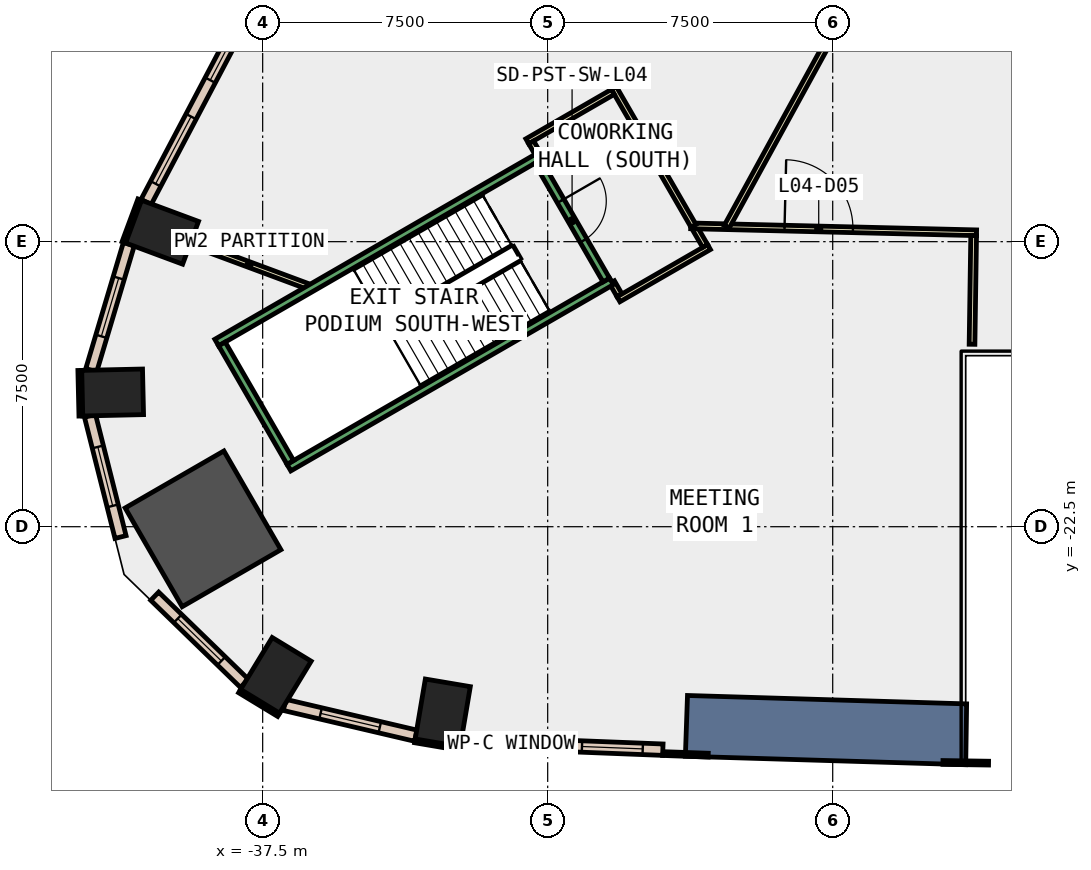
"""IFC4 building model, lengths in metres.
Left out: names, types, materials, properties, quantities, classifications, styles, units other than length and angle.
Written with IfcOpenShell. Run it as: python <this file> out.ifc"""

import sys

from ifc_helpers import new_model, si_unit, direction, frame, frame_2d, origin, origin_2d, place, context, subcontext, project, spatial, polyline, rectangle, outline, extrude, element, fill, save


model = new_model("IFC4")
c1 = context("Model", 3, precision=1e-05, world=origin(), true_north=direction((0.0, 1.0)))
c2 = subcontext(c1, "Body", "Model", "MODEL_VIEW")
j1 = project(units=[si_unit("LENGTHUNIT", "METRE"), si_unit("PLANEANGLEUNIT", "RADIAN")], contexts=[c1])
p1 = place(None, origin())
s1 = spatial("IfcSite", under=j1, at=p1, CompositionType="ELEMENT")
p2 = place(p1, origin())
s2 = spatial("IfcBuilding", under=s1, at=p2, CompositionType="ELEMENT")
p3 = place(p2, frame((0.0, 0.0, 25.0)))
s3 = spatial("IfcBuildingStorey", under=s2, at=p3, CompositionType="ELEMENT", Elevation=25.0)
for number, where, z_axis, x_axis in (
    (1, (-32.761, -27.397, -0.45), (0.0, 0.0, 1.0), (-0.986, 0.167, 0.0)),
    (2, (-40.147, -14.751, -0.45), (0.0, 0.0, 1.0), (0.348, 0.937, 0.0)),
    (3, (-41.448, -18.969, -0.45), (0.0, 0.0, 1.0), (-0.023, 1.0, 0.0)),
):
    element("IfcColumn", number, at=place(p3, frame(where, z_axis=z_axis, x_axis=x_axis)), inside=s3, PredefinedType="COLUMN", context=c2, shape_type="SweptSolid", body=[
        extrude(rectangle(XDim=1.2, YDim=1.6, at=origin_2d()), origin(), (0.0, 0.0, 1.0), 5.0),
    ])
p4 = place(p3, frame((-39.069, -22.556, -0.45), z_axis=(0.0, 0.0, 1.0), x_axis=(0.866025403784, 0.5, 0.0)))
e4 = element("IfcColumn", 4, at=p4, inside=s3, PredefinedType="COLUMN", context=c2, shape_type="SweptSolid", body=[
    extrude(rectangle(XDim=3.0, YDim=3.0, at=origin_2d()), origin(), (0.0, 0.0, 1.0), 5.0),
])
p5 = place(p3, frame((-37.152, -26.411, -0.45), z_axis=(0.0, 0.0, 1.0), x_axis=(-0.854522294989, 0.519414716163, 0.0)))
e5 = element("IfcColumn", 5, at=p5, inside=s3, PredefinedType="COLUMN", context=c2, shape_type="SweptSolid", body=[
    extrude(rectangle(XDim=1.2, YDim=1.6, at=origin_2d()), origin(), (0.0, 0.0, 1.0), 5.0),
])
p6 = place(p3, frame((0.0, 0.0, -0.45)))
e6 = element("IfcWall", 6, at=p6, inside=s3, PredefinedType="SHEAR", context=c2, shape_type="SweptSolid", body=[
    extrude(outline(polyline([(-26.377, -28.54), (-19.0, -28.762), (-18.976, -27.162), (-26.321, -26.941), (-26.377, -28.54)])), origin(), (0.0, 0.0, 1.0), 5.0),
])
p7 = place(p3, frame((-40.735, -13.893, 0.0), z_axis=(0.0, 0.0, 1.0), x_axis=(-0.348268249601, -0.937394914814, 0.0)))
e7 = element("IfcWall", 7, at=p7, inside=s3, PredefinedType="STANDARD", context=c2, shape_type="SweptSolid", body=[
    extrude(rectangle(XDim=1.2, YDim=0.1, at=frame_2d((0.6, 0.0))), origin(), (0.0, 0.0, 1.0), 4.55),
])
p8 = place(p3, frame((-33.494, -28.135, 0.0), z_axis=(0.0, 0.0, 1.0), x_axis=(0.986011774526, -0.166675674579, 0.0)))
e8 = element("IfcWall", 8, at=p8, inside=s3, PredefinedType="STANDARD", context=c2, shape_type="SweptSolid", body=[
    extrude(rectangle(XDim=1.2, YDim=0.1, at=frame_2d((0.6, 0.0))), origin(), (0.0, 0.0, 1.0), 4.55),
])
p9 = place(p3, frame((-26.975, -28.469, 0.0), z_axis=(0.0, 0.0, 1.0), x_axis=(0.999387493042, -0.034994838926, 0.0)))
e9 = element("IfcWall", 9, at=p9, inside=s3, PredefinedType="STANDARD", context=c2, shape_type="SweptSolid", body=[
    extrude(rectangle(XDim=1.2, YDim=0.1, at=frame_2d((0.6, 0.0))), origin(), (0.0, 0.0, 1.0), 4.55),
])
p10 = place(p3, frame((-19.599, -28.703, 0.0), z_axis=(0.0, 0.0, 1.0), x_axis=(0.999886724523, -0.015051183404, 0.0)))
e10 = element("IfcWall", 10, at=p10, inside=s3, PredefinedType="STANDARD", context=c2, shape_type="SweptSolid", body=[
    extrude(rectangle(XDim=1.2, YDim=0.1, at=frame_2d((0.6, 0.0))), origin(), (0.0, 0.0, 1.0), 4.55),
])
for number, where, z_axis, x_axis in (
    (11, (-42.312, -18.388, 0.0), (0.0, 0.0, 1.0), (0.023, -1.0, 0.0)),
    (12, (-38.106, -26.826, 0.0), (0.0, 0.0, 1.0), (0.855, -0.519, 0.0)),
):
    element("IfcWall", number, at=place(p3, frame(where, z_axis=z_axis, x_axis=x_axis)), inside=s3, PredefinedType="STANDARD", context=c2, shape_type="SweptSolid", body=[
        extrude(rectangle(XDim=1.2, YDim=0.1, at=frame_2d((0.6, 0.0))), origin(), (0.0, 0.0, 1.0), 4.55),
    ])
p11 = place(p3, frame((-32.282, -28.159, 0.0), z_axis=(0.0, 0.0, 1.0), x_axis=(0.999234205654, -0.039128023863, 0.0)))
e13 = element("IfcWall", 13, at=p11, inside=s3, PredefinedType="STANDARD", context=c2, shape_type="SweptSolid", body=[
    extrude(rectangle(XDim=5.316, YDim=0.3, at=frame_2d((2.658, 0.0))), origin(), (0.0, 0.0, 1.0), 4.55),
])
p12 = place(p11, frame((0.529, 0.0, 1.0)))
e14 = element("IfcOpeningElement", 14, at=p12, cuts=e13, PredefinedType="OPENING", context=c2, shape_type="SweptSolid", body=[
    extrude(rectangle(XDim=1.6, YDim=3.2, at=frame_2d((0.8, 1.6))), frame((0.0, 0.16, 0.0), z_axis=(0.0, -1.0, 0.0), x_axis=(1.0, 0.0, 0.0)), (0.0, 0.0, 1.0), 0.32),
])
p13 = place(p11, frame((3.187, 0.0, 1.0)))
e15 = element("IfcOpeningElement", 15, at=p13, cuts=e13, PredefinedType="OPENING", context=c2, shape_type="SweptSolid", body=[
    extrude(rectangle(XDim=1.6, YDim=3.2, at=frame_2d((0.8, 1.6))), frame((0.0, 0.16, 0.0), z_axis=(0.0, -1.0, 0.0), x_axis=(1.0, 0.0, 0.0)), (0.0, 0.0, 1.0), 0.32),
])
p14 = place(p3, frame((-37.695, -8.503, 0.0), z_axis=(0.0, 0.0, 1.0), x_axis=(-0.466125129602, -0.884718804792, 0.0)))
e16 = element("IfcWall", 16, at=p14, inside=s3, PredefinedType="STANDARD", context=c2, shape_type="SweptSolid", body=[
    extrude(rectangle(XDim=6.164, YDim=0.3, at=frame_2d((3.082, 0.0))), origin(), (0.0, 0.0, 1.0), 4.55),
])
p15 = place(p14, frame((0.541, 0.0, 1.0)))
e17 = element("IfcOpeningElement", 17, at=p15, cuts=e16, PredefinedType="OPENING", context=c2, shape_type="SweptSolid", body=[
    extrude(rectangle(XDim=2.0, YDim=3.2, at=frame_2d((1.0, 1.6))), frame((0.0, 0.16, 0.0), z_axis=(0.0, -1.0, 0.0), x_axis=(1.0, 0.0, 0.0)), (0.0, 0.0, 1.0), 0.32),
])
p16 = place(p14, frame((3.623, 0.0, 1.0)))
e18 = element("IfcOpeningElement", 18, at=p16, cuts=e16, PredefinedType="OPENING", context=c2, shape_type="SweptSolid", body=[
    extrude(rectangle(XDim=2.0, YDim=3.2, at=frame_2d((1.0, 1.6))), frame((0.0, 0.16, 0.0), z_axis=(0.0, -1.0, 0.0), x_axis=(1.0, 0.0, 0.0)), (0.0, 0.0, 1.0), 0.32),
])
p17 = place(p3, frame((-41.022, -15.066, 0.0), z_axis=(0.0, 0.0, 1.0), x_axis=(-0.285800575124, -0.958289116738, 0.0)))
e19 = element("IfcWall", 19, at=p17, inside=s3, PredefinedType="STANDARD", context=c2, shape_type="SweptSolid", body=[
    extrude(rectangle(XDim=3.46, YDim=0.3, at=frame_2d((1.73, 0.0))), origin(), (0.0, 0.0, 1.0), 4.55),
])
p18 = place(p17, frame((0.93, 0.0, 1.0)))
e20 = element("IfcOpeningElement", 20, at=p18, cuts=e19, PredefinedType="OPENING", context=c2, shape_type="SweptSolid", body=[
    extrude(rectangle(XDim=1.6, YDim=3.2, at=frame_2d((0.8, 1.6))), frame((0.0, 0.16, 0.0), z_axis=(0.0, -1.0, 0.0), x_axis=(1.0, 0.0, 0.0)), (0.0, 0.0, 1.0), 0.32),
])
p19 = place(p3, frame((-42.044, -19.581, 0.0), z_axis=(0.0, 0.0, 1.0), x_axis=(0.244315836028, -0.969695711172, 0.0)))
e21 = element("IfcWall", 21, at=p19, inside=s3, PredefinedType="STANDARD", context=c2, shape_type="SweptSolid", body=[
    extrude(rectangle(XDim=3.291, YDim=0.3, at=frame_2d((1.645, 0.0))), origin(), (0.0, 0.0, 1.0), 4.55),
])
p20 = place(p19, frame((0.845, 0.0, 1.0)))
e22 = element("IfcOpeningElement", 22, at=p20, cuts=e21, PredefinedType="OPENING", context=c2, shape_type="SweptSolid", body=[
    extrude(rectangle(XDim=1.6, YDim=3.2, at=frame_2d((0.8, 1.6))), frame((0.0, 0.16, 0.0), z_axis=(0.0, -1.0, 0.0), x_axis=(1.0, 0.0, 0.0)), (0.0, 0.0, 1.0), 0.32),
])
p21 = place(p3, frame((-40.341, -24.329, 0.0), z_axis=(0.0, 0.0, 1.0), x_axis=(0.717527250225, -0.696530433782, 0.0)))
e23 = element("IfcWall", 23, at=p21, inside=s3, PredefinedType="STANDARD", context=c2, shape_type="SweptSolid", body=[
    extrude(rectangle(XDim=3.291, YDim=0.3, at=frame_2d((1.645, 0.0))), origin(), (0.0, 0.0, 1.0), 4.55),
])
p22 = place(p21, frame((0.845, 0.0, 1.0)))
e24 = element("IfcOpeningElement", 24, at=p22, cuts=e23, PredefinedType="OPENING", context=c2, shape_type="SweptSolid", body=[
    extrude(rectangle(XDim=1.6, YDim=3.2, at=frame_2d((0.8, 1.6))), frame((0.0, 0.16, 0.0), z_axis=(0.0, -1.0, 0.0), x_axis=(1.0, 0.0, 0.0)), (0.0, 0.0, 1.0), 0.32),
])
p23 = place(p3, frame((-36.923, -27.189, 0.0), z_axis=(0.0, 0.0, 1.0), x_axis=(0.97357041301, -0.228387063799, 0.0)))
e25 = element("IfcWall", 25, at=p23, inside=s3, PredefinedType="STANDARD", context=c2, shape_type="SweptSolid", body=[
    extrude(rectangle(XDim=3.547, YDim=0.3, at=frame_2d((1.773, 0.0))), origin(), (0.0, 0.0, 1.0), 4.55),
])
p24 = place(p23, frame((0.973, 0.0, 1.0)))
e26 = element("IfcOpeningElement", 26, at=p24, cuts=e25, PredefinedType="OPENING", context=c2, shape_type="SweptSolid", body=[
    extrude(rectangle(XDim=1.6, YDim=3.2, at=frame_2d((0.8, 1.6))), frame((0.0, 0.16, 0.0), z_axis=(0.0, -1.0, 0.0), x_axis=(1.0, 0.0, 0.0)), (0.0, 0.0, 1.0), 0.32),
])
p25 = place(p3, frame((-39.378, -15.037, 0.0), z_axis=(0.0, 0.0, 1.0), x_axis=(0.937400028274, -0.348254485961, 0.0)))
e27 = element("IfcWall", 27, at=p25, inside=s3, PredefinedType="PARTITIONING", context=c2, shape_type="SweptSolid", body=[
    extrude(rectangle(XDim=3.247, YDim=0.15, at=frame_2d((1.624, 0.0))), origin(), (0.0, 0.0, 1.0), 4.55),
])
p26 = place(p3, frame((-28.309, -16.067, 0.0), z_axis=(0.0, 0.0, 1.0), x_axis=(0.499546646484, -0.86628698939, 0.0)))
e28 = element("IfcWall", 28, at=p26, inside=s3, PredefinedType="PARTITIONING", context=c2, shape_type="SweptSolid", body=[
    extrude(rectangle(XDim=0.401, YDim=0.15, at=frame_2d((0.2, 0.0))), origin(), (0.0, 0.0, 1.0), 4.55),
])
p27 = place(p3, frame((-28.137, -16.516, 0.0), z_axis=(0.0, 0.0, 1.0), x_axis=(0.866225489901, 0.499653280431, 0.0)))
e29 = element("IfcWall", 29, at=p27, inside=s3, PredefinedType="PARTITIONING", context=c2, shape_type="SweptSolid", body=[
    extrude(rectangle(XDim=2.75, YDim=0.15, at=frame_2d((1.375, 0.0))), origin(), (0.0, 0.0, 1.0), 4.55),
])
p28 = place(p3, frame((-25.857, -15.114, 0.0), z_axis=(0.0, 0.0, 1.0), x_axis=(-0.500357623318, 0.865818831389, 0.0)))
e30 = element("IfcWall", 30, at=p28, inside=s3, PredefinedType="PARTITIONING", context=c2, shape_type="SweptSolid", body=[
    extrude(rectangle(XDim=0.61, YDim=0.15, at=frame_2d((0.305, 0.0))), origin(), (0.0, 0.0, 1.0), 4.55),
])
p29 = place(p3, frame((-26.236, -14.584, 0.0), z_axis=(0.0, 0.0, 1.0), x_axis=(0.999706920069, -0.024208964564, 0.0)))
e31 = element("IfcWall", 31, at=p29, inside=s3, PredefinedType="PARTITIONING", context=c2, shape_type="SweptSolid", body=[
    extrude(rectangle(XDim=7.523, YDim=0.15, at=frame_2d((3.762, 0.0))), origin(), (0.0, 0.0, 1.0), 4.55),
])
p30 = place(p29, frame((2.469, 0.0, 0.0)))
e32 = element("IfcOpeningElement", 32, at=p30, cuts=e31, PredefinedType="OPENING", context=c2, shape_type="SweptSolid", body=[
    extrude(rectangle(XDim=1.8, YDim=2.1, at=frame_2d((0.9, 1.05))), frame((0.0, 0.085, 0.0), z_axis=(0.0, -1.0, 0.0), x_axis=(1.0, 0.0, 0.0)), (0.0, 0.0, 1.0), 0.17),
])
p31 = place(p3, frame((-18.791, -14.839, 0.0), z_axis=(0.0, 0.0, 1.0), x_axis=(-0.015017934076, -0.999887224469, 0.0)))
e33 = element("IfcWall", 33, at=p31, inside=s3, PredefinedType="PARTITIONING", context=c2, shape_type="SweptSolid", body=[
    extrude(rectangle(XDim=2.861, YDim=0.15, at=frame_2d((1.431, 0.0))), origin(), (0.0, 0.0, 1.0), 4.55),
])
p32 = place(p3, frame((-26.162, -14.586, 0.0), z_axis=(0.0, 0.0, 1.0), x_axis=(-0.500142678011, 0.865943012924, 0.0)))
e34 = element("IfcWall", 34, at=p32, inside=s3, PredefinedType="PARTITIONING", context=c2, shape_type="SweptSolid", body=[
    extrude(rectangle(XDim=4.191, YDim=0.15, at=frame_2d((2.095, 0.0))), origin(), (0.0, 0.0, 1.0), 4.55),
])
p33 = place(p3, frame((-28.285, -11.059, 0.0), z_axis=(0.0, 0.0, 1.0), x_axis=(-0.866108986466, -0.499855202596, 0.0)))
e35 = element("IfcWall", 35, at=p33, inside=s3, PredefinedType="PARTITIONING", context=c2, shape_type="SweptSolid", body=[
    extrude(rectangle(XDim=2.6, YDim=0.15, at=frame_2d((1.3, 0.0))), origin(), (0.0, 0.0, 1.0), 4.55),
])
p34 = place(p3, frame((-30.434, -12.387, 0.0), z_axis=(0.0, 0.0, 1.0), x_axis=(0.500867716848, -0.865523847285, 0.0)))
e36 = element("IfcWall", 36, at=p34, inside=s3, PredefinedType="PARTITIONING", context=c2, shape_type="SweptSolid", body=[
    extrude(rectangle(XDim=0.4, YDim=0.15, at=frame_2d((0.2, 0.0))), origin(), (0.0, 0.0, 1.0), 4.55),
])
p35 = place(p3, frame((-21.632, -7.934, 0.0), z_axis=(0.0, 0.0, 1.0), x_axis=(-0.480597861754, -0.876941101373, 0.0)))
e37 = element("IfcWall", 37, at=p35, inside=s3, PredefinedType="PARTITIONING", context=c2, shape_type="SweptSolid", body=[
    extrude(rectangle(XDim=7.609, YDim=0.15, at=frame_2d((3.805, 0.0))), origin(), (0.0, 0.0, 1.0), 4.55),
])
for number, where, z_axis, x_axis in (
    (38, (-30.222, -12.755, 0.0), (0.0, 0.0, 1.0), (-0.866, -0.5, 0.0)),
    (39, (-28.322, -16.045, 0.0), (0.0, 0.0, 1.0), (-0.866, -0.5, 0.0)),
):
    element("IfcWall", number, at=place(p3, frame(where, z_axis=z_axis, x_axis=x_axis)), inside=s3, PredefinedType="STANDARD", context=c2, shape_type="SweptSolid", body=[
        extrude(rectangle(XDim=9.8, YDim=0.2, at=frame_2d((4.9, 0.0))), origin(), (0.0, 0.0, 1.0), 4.55),
    ])
p36 = place(p3, frame((-30.258, -12.891, 0.0), z_axis=(0.0, 0.0, 1.0), x_axis=(0.499982693035, -0.866035395735, 0.0)))
e40 = element("IfcWall", 40, at=p36, inside=s3, PredefinedType="STANDARD", context=c2, shape_type="SweptSolid", body=[
    extrude(rectangle(XDim=3.6, YDim=0.2, at=frame_2d((1.8, 0.0))), origin(), (0.0, 0.0, 1.0), 4.55),
])
p37 = place(p36, frame((1.2, 0.0, 0.0)))
e41 = element("IfcOpeningElement", 41, at=p37, cuts=e40, PredefinedType="OPENING", context=c2, shape_type="SweptSolid", body=[
    extrude(rectangle(XDim=1.2, YDim=2.2, at=frame_2d((0.6, 1.1))), frame((0.0, 0.11, 0.0), z_axis=(0.0, -1.0, 0.0), x_axis=(1.0, 0.0, 0.0)), (0.0, 0.0, 1.0), 0.22),
])
p38 = place(p3, frame((-38.572, -17.691, 0.0), z_axis=(0.0, 0.0, 1.0), x_axis=(0.49995333141, -0.866052346231, 0.0)))
e42 = element("IfcWall", 42, at=p38, inside=s3, PredefinedType="STANDARD", context=c2, shape_type="SweptSolid", body=[
    extrude(rectangle(XDim=3.6, YDim=0.2, at=frame_2d((1.8, 0.0))), origin(), (0.0, 0.0, 1.0), 4.55),
])
p39 = place(p12, origin())
e43 = element("IfcWindow", 43, at=p39, inside=s3, PartitioningType="SINGLE_PANEL", PredefinedType="WINDOW", context=c2, shape_type="SweptSolid", body=[
    extrude(rectangle(XDim=1.6, YDim=3.2, at=frame_2d((0.8, 1.6))), frame((0.0, 0.03, 0.0), z_axis=(0.0, -1.0, 0.0), x_axis=(1.0, 0.0, 0.0)), (0.0, 0.0, 1.0), 0.06),
])
fill(e14, e43)
p40 = place(p13, origin())
e44 = element("IfcWindow", 44, at=p40, inside=s3, PartitioningType="SINGLE_PANEL", PredefinedType="WINDOW", context=c2, shape_type="SweptSolid", body=[
    extrude(rectangle(XDim=1.6, YDim=3.2, at=frame_2d((0.8, 1.6))), frame((0.0, 0.03, 0.0), z_axis=(0.0, -1.0, 0.0), x_axis=(1.0, 0.0, 0.0)), (0.0, 0.0, 1.0), 0.06),
])
fill(e15, e44)
p41 = place(p15, origin())
e45 = element("IfcWindow", 45, at=p41, inside=s3, PartitioningType="SINGLE_PANEL", PredefinedType="WINDOW", context=c2, shape_type="SweptSolid", body=[
    extrude(rectangle(XDim=2.0, YDim=3.2, at=frame_2d((1.0, 1.6))), frame((0.0, 0.03, 0.0), z_axis=(0.0, -1.0, 0.0), x_axis=(1.0, 0.0, 0.0)), (0.0, 0.0, 1.0), 0.06),
])
fill(e17, e45)
p42 = place(p16, origin())
e46 = element("IfcWindow", 46, at=p42, inside=s3, PartitioningType="SINGLE_PANEL", PredefinedType="WINDOW", context=c2, shape_type="SweptSolid", body=[
    extrude(rectangle(XDim=2.0, YDim=3.2, at=frame_2d((1.0, 1.6))), frame((0.0, 0.03, 0.0), z_axis=(0.0, -1.0, 0.0), x_axis=(1.0, 0.0, 0.0)), (0.0, 0.0, 1.0), 0.06),
])
fill(e18, e46)
p43 = place(p18, origin())
e47 = element("IfcWindow", 47, at=p43, inside=s3, PartitioningType="SINGLE_PANEL", PredefinedType="WINDOW", context=c2, shape_type="SweptSolid", body=[
    extrude(rectangle(XDim=1.6, YDim=3.2, at=frame_2d((0.8, 1.6))), frame((0.0, 0.03, 0.0), z_axis=(0.0, -1.0, 0.0), x_axis=(1.0, 0.0, 0.0)), (0.0, 0.0, 1.0), 0.06),
])
fill(e20, e47)
p44 = place(p20, origin())
e48 = element("IfcWindow", 48, at=p44, inside=s3, PartitioningType="SINGLE_PANEL", PredefinedType="WINDOW", context=c2, shape_type="SweptSolid", body=[
    extrude(rectangle(XDim=1.6, YDim=3.2, at=frame_2d((0.8, 1.6))), frame((0.0, 0.03, 0.0), z_axis=(0.0, -1.0, 0.0), x_axis=(1.0, 0.0, 0.0)), (0.0, 0.0, 1.0), 0.06),
])
fill(e22, e48)
p45 = place(p22, origin())
e49 = element("IfcWindow", 49, at=p45, inside=s3, PartitioningType="SINGLE_PANEL", PredefinedType="WINDOW", context=c2, shape_type="SweptSolid", body=[
    extrude(rectangle(XDim=1.6, YDim=3.2, at=frame_2d((0.8, 1.6))), frame((0.0, 0.03, 0.0), z_axis=(0.0, -1.0, 0.0), x_axis=(1.0, 0.0, 0.0)), (0.0, 0.0, 1.0), 0.06),
])
fill(e24, e49)
p46 = place(p24, origin())
e50 = element("IfcWindow", 50, at=p46, inside=s3, PartitioningType="SINGLE_PANEL", PredefinedType="WINDOW", context=c2, shape_type="SweptSolid", body=[
    extrude(rectangle(XDim=1.6, YDim=3.2, at=frame_2d((0.8, 1.6))), frame((0.0, 0.03, 0.0), z_axis=(0.0, -1.0, 0.0), x_axis=(1.0, 0.0, 0.0)), (0.0, 0.0, 1.0), 0.06),
])
fill(e26, e50)
p47 = place(p30, origin())
e51 = element("IfcDoor", 51, at=p47, inside=s3, OperationType="DOUBLE_DOOR_SINGLE_SWING", PredefinedType="DOOR", context=c2, shape_type="SweptSolid", body=[
    extrude(rectangle(XDim=1.8, YDim=2.1, at=frame_2d((0.9, 1.05))), frame((0.0, 0.025, 0.0), z_axis=(0.0, -1.0, 0.0), x_axis=(1.0, 0.0, 0.0)), (0.0, 0.0, 1.0), 0.05),
])
fill(e32, e51)
p48 = place(p37, origin())
e52 = element("IfcDoor", 52, at=p48, inside=s3, OperationType="SINGLE_SWING_LEFT", PredefinedType="DOOR", context=c2, shape_type="SweptSolid", body=[
    extrude(rectangle(XDim=1.2, YDim=2.2, at=frame_2d((0.6, 1.1))), frame((0.0, 0.025, 0.0), z_axis=(0.0, -1.0, 0.0), x_axis=(1.0, 0.0, 0.0)), (0.0, 0.0, 1.0), 0.05),
])
fill(e41, e52)
save(model, sys.argv[1])
